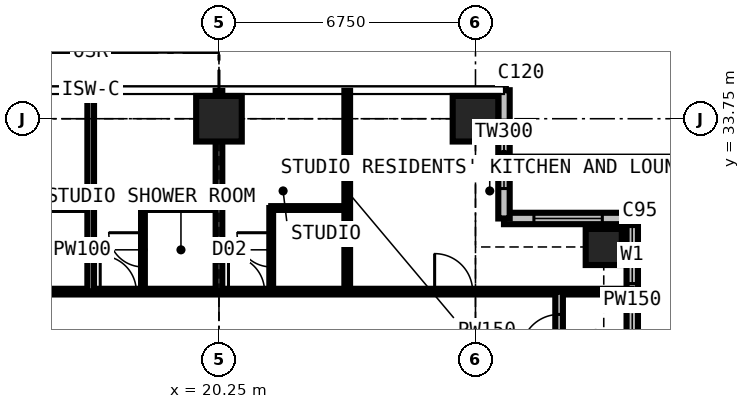
"""IFC4 building model, lengths in metres.
Left out: names, types, materials, properties, quantities, classifications, styles, units other than length and angle.
Written with IfcOpenShell. Run it as: python <this file> out.ifc"""

import sys

from ifc_helpers import new_model, si_unit, direction, frame, frame_2d, origin, origin_2d, place, context, subcontext, project, spatial, rectangle, extrude, element, fill, save


model = new_model("IFC4")
c1 = context("Model", 3, precision=1e-05, world=origin(), true_north=direction((0.0, 1.0)))
c2 = subcontext(c1, "Body", "Model", "MODEL_VIEW")
j1 = project(units=[si_unit("LENGTHUNIT", "METRE"), si_unit("PLANEANGLEUNIT", "RADIAN")], contexts=[c1])
p1 = place(None, origin())
s1 = spatial("IfcSite", under=j1, at=p1, CompositionType="ELEMENT")
p2 = place(p1, origin())
s2 = spatial("IfcBuilding", under=s1, at=p2, CompositionType="ELEMENT")
p3 = place(p2, frame((0.0, 0.0, 181.8)))
s3 = spatial("IfcBuildingStorey", under=s2, at=p3, CompositionType="ELEMENT", Elevation=181.8)
for number, where, z_axis, x_axis in (
    (1, (20.25, 33.75, 0.0), (0.0, 0.0, 1.0), (1.0, 0.0, 0.0)),
    (2, (27.0, 33.75, 0.0), (0.0, 0.0, 1.0), (1.0, 0.0, 0.0)),
):
    element("IfcColumn", number, at=place(p3, frame(where, z_axis=z_axis, x_axis=x_axis)), inside=s3, PredefinedType="COLUMN", context=c2, shape_type="SweptSolid", body=[
        extrude(rectangle(XDim=1.2, YDim=1.2, at=origin_2d()), origin(), (0.0, 0.0, 1.0), 3.6),
    ])
p4 = place(p3, frame((30.375, 30.375, 0.0), z_axis=(0.0, 0.0, 1.0), x_axis=(1.0, 0.0, 0.0)))
e3 = element("IfcColumn", 3, at=p4, inside=s3, PredefinedType="COLUMN", context=c2, shape_type="SweptSolid", body=[
    extrude(rectangle(XDim=0.95, YDim=0.95, at=origin_2d()), origin(), (0.0, 0.0, 1.0), 3.6),
])
p5 = place(p3, frame((31.125, 27.75, 0.0), z_axis=(0.0, 0.0, 1.0), x_axis=(0.0, 1.0, 0.0)))
e4 = element("IfcWall", 4, at=p5, inside=s3, PredefinedType="SOLIDWALL", context=c2, shape_type="SweptSolid", body=[
    extrude(rectangle(XDim=3.375, YDim=0.3, at=frame_2d((1.688, 0.0))), origin(), (0.0, 0.0, 1.0), 3.375),
])
p6 = place(p5, frame((1.663, 0.0, 0.9)))
e5 = element("IfcOpeningElement", 5, at=p6, cuts=e4, PredefinedType="OPENING", context=c2, shape_type="SweptSolid", body=[
    extrude(rectangle(XDim=1.5, YDim=1.8, at=frame_2d((0.75, 0.9))), frame((0.0, 0.16, 0.0), z_axis=(0.0, -1.0, 0.0), x_axis=(1.0, 0.0, 0.0)), (0.0, 0.0, 1.0), 0.32),
])
p7 = place(p3, frame((31.125, 31.125, 0.0), z_axis=(0.0, 0.0, 1.0), x_axis=(-1.0, 0.0, 0.0)))
e6 = element("IfcWall", 6, at=p7, inside=s3, PredefinedType="SOLIDWALL", context=c2, shape_type="SweptSolid", body=[
    extrude(rectangle(XDim=3.375, YDim=0.3, at=frame_2d((1.688, 0.0))), origin(), (0.0, 0.0, 1.0), 3.375),
])
p8 = place(p7, frame((0.788, 0.0, 0.6)))
e7 = element("IfcOpeningElement", 7, at=p8, cuts=e6, PredefinedType="OPENING", context=c2, shape_type="SweptSolid", body=[
    extrude(rectangle(XDim=1.8, YDim=2.1, at=frame_2d((0.9, 1.05))), frame((0.0, 0.16, 0.0), z_axis=(0.0, -1.0, 0.0), x_axis=(1.0, 0.0, 0.0)), (0.0, 0.0, 1.0), 0.32),
])
p9 = place(p3, frame((27.75, 31.125, 0.0), z_axis=(0.0, 0.0, 1.0), x_axis=(0.0, 1.0, 0.0)))
e8 = element("IfcWall", 8, at=p9, inside=s3, PredefinedType="SOLIDWALL", context=c2, shape_type="SweptSolid", body=[
    extrude(rectangle(XDim=3.375, YDim=0.3, at=frame_2d((1.688, 0.0))), origin(), (0.0, 0.0, 1.0), 3.375),
])
p10 = place(p9, frame((0.788, 0.0, 0.6)))
e9 = element("IfcOpeningElement", 9, at=p10, cuts=e8, PredefinedType="OPENING", context=c2, shape_type="SweptSolid", body=[
    extrude(rectangle(XDim=1.8, YDim=2.1, at=frame_2d((0.9, 1.05))), frame((0.0, 0.16, 0.0), z_axis=(0.0, -1.0, 0.0), x_axis=(1.0, 0.0, 0.0)), (0.0, 0.0, 1.0), 0.32),
])
p11 = place(p3, frame((11.3, 29.2, 0.0), z_axis=(0.0, 0.0, 1.0), x_axis=(1.0, 0.0, 0.0)))
e10 = element("IfcWall", 10, at=p11, inside=s3, PredefinedType="PARTITIONING", context=c2, shape_type="SweptSolid", body=[
    extrude(rectangle(XDim=19.809, YDim=0.15, at=frame_2d((9.904, 0.0))), origin(), (0.0, 0.0, 1.0), 3.375),
])
p12 = place(p11, frame((14.625, 0.0, 0.0)))
e11 = element("IfcOpeningElement", 11, at=p12, cuts=e10, PredefinedType="OPENING", context=c2, shape_type="SweptSolid", body=[
    extrude(rectangle(XDim=1.0, YDim=2.2, at=frame_2d((0.5, 1.1))), frame((0.0, 0.085, 0.0), z_axis=(0.0, -1.0, 0.0), x_axis=(1.0, 0.0, 0.0)), (0.0, 0.0, 1.0), 0.17),
])
p13 = place(p11, frame((5.825, 0.0, 0.0)))
e12 = element("IfcOpeningElement", 12, at=p13, cuts=e10, PredefinedType="OPENING", context=c2, shape_type="SweptSolid", body=[
    extrude(rectangle(XDim=0.95, YDim=2.2, at=frame_2d((0.475, 1.1))), frame((0.0, 0.085, 0.0), z_axis=(0.0, -1.0, 0.0), x_axis=(1.0, 0.0, 0.0)), (0.0, 0.0, 1.0), 0.17),
])
p14 = place(p11, frame((9.2, 0.0, 0.0)))
e13 = element("IfcOpeningElement", 13, at=p14, cuts=e10, PredefinedType="OPENING", context=c2, shape_type="SweptSolid", body=[
    extrude(rectangle(XDim=0.95, YDim=2.2, at=frame_2d((0.475, 1.1))), frame((0.0, 0.085, 0.0), z_axis=(0.0, -1.0, 0.0), x_axis=(1.0, 0.0, 0.0)), (0.0, 0.0, 1.0), 0.17),
])
p15 = place(p11, frame((0.6, 0.0, 0.0)))
e14 = element("IfcOpeningElement", 14, at=p15, cuts=e10, PredefinedType="OPENING", context=c2, shape_type="SweptSolid", body=[
    extrude(rectangle(XDim=1.0, YDim=2.2, at=frame_2d((0.5, 1.1))), frame((0.0, 0.085, 0.0), z_axis=(0.0, -1.0, 0.0), x_axis=(1.0, 0.0, 0.0)), (0.0, 0.0, 1.0), 0.17),
])
p16 = place(p3, frame((14.875, 31.4, 0.0), z_axis=(0.0, 0.0, 1.0), x_axis=(1.0, 0.0, 0.0)))
e15 = element("IfcWall", 15, at=p16, inside=s3, PredefinedType="PARTITIONING", context=c2, shape_type="SweptSolid", body=[
    extrude(rectangle(XDim=2.0, YDim=0.1, at=frame_2d((1.0, 0.0))), origin(), (0.0, 0.0, 1.0), 3.375),
])
p17 = place(p3, frame((16.875, 29.2, 0.0), z_axis=(0.0, 0.0, 1.0), x_axis=(0.0, 1.0, 0.0)))
e16 = element("IfcWall", 16, at=p17, inside=s3, PredefinedType="PARTITIONING", context=c2, shape_type="SweptSolid", body=[
    extrude(rectangle(XDim=5.284, YDim=0.175, at=frame_2d((2.642, 0.0))), origin(), (0.0, 0.0, 1.0), 3.375),
])
p18 = place(p3, frame((18.25, 29.2, 0.0), z_axis=(0.0, 0.0, 1.0), x_axis=(0.0, 1.0, 0.0)))
e17 = element("IfcWall", 17, at=p18, inside=s3, PredefinedType="PARTITIONING", context=c2, shape_type="SweptSolid", body=[
    extrude(rectangle(XDim=2.2, YDim=0.1, at=frame_2d((1.1, 0.0))), origin(), (0.0, 0.0, 1.0), 3.375),
])
p19 = place(p18, frame((0.65, 0.0, 0.0)))
e18 = element("IfcOpeningElement", 18, at=p19, cuts=e17, PredefinedType="OPENING", context=c2, shape_type="SweptSolid", body=[
    extrude(rectangle(XDim=0.9, YDim=2.2, at=frame_2d((0.45, 1.1))), frame((0.0, 0.06, 0.0), z_axis=(0.0, -1.0, 0.0), x_axis=(1.0, 0.0, 0.0)), (0.0, 0.0, 1.0), 0.12),
])
p20 = place(p3, frame((18.25, 31.4, 0.0), z_axis=(0.0, 0.0, 1.0), x_axis=(1.0, 0.0, 0.0)))
e19 = element("IfcWall", 19, at=p20, inside=s3, PredefinedType="PARTITIONING", context=c2, shape_type="SweptSolid", body=[
    extrude(rectangle(XDim=2.0, YDim=0.1, at=frame_2d((1.0, 0.0))), origin(), (0.0, 0.0, 1.0), 3.375),
])
p21 = place(p3, frame((20.25, 29.2, 0.0), z_axis=(0.0, 0.0, 1.0), x_axis=(0.0, 1.0, 0.0)))
e20 = element("IfcWall", 20, at=p21, inside=s3, PredefinedType="PARTITIONING", context=c2, shape_type="SweptSolid", body=[
    extrude(rectangle(XDim=5.284, YDim=0.175, at=frame_2d((2.642, 0.0))), origin(), (0.0, 0.0, 1.0), 2.61),
])
p22 = place(p3, frame((21.625, 29.2, 0.0), z_axis=(0.0, 0.0, 1.0), x_axis=(0.0, 1.0, 0.0)))
e21 = element("IfcWall", 21, at=p22, inside=s3, PredefinedType="PARTITIONING", context=c2, shape_type="SweptSolid", body=[
    extrude(rectangle(XDim=2.2, YDim=0.1, at=frame_2d((1.1, 0.0))), origin(), (0.0, 0.0, 1.0), 3.375),
])
p23 = place(p22, frame((0.65, 0.0, 0.0)))
e22 = element("IfcOpeningElement", 22, at=p23, cuts=e21, PredefinedType="OPENING", context=c2, shape_type="SweptSolid", body=[
    extrude(rectangle(XDim=0.9, YDim=2.2, at=frame_2d((0.45, 1.1))), frame((0.0, 0.06, 0.0), z_axis=(0.0, -1.0, 0.0), x_axis=(1.0, 0.0, 0.0)), (0.0, 0.0, 1.0), 0.12),
])
p24 = place(p3, frame((21.625, 31.4, 0.0), z_axis=(0.0, 0.0, 1.0), x_axis=(1.0, 0.0, 0.0)))
e23 = element("IfcWall", 23, at=p24, inside=s3, PredefinedType="PARTITIONING", context=c2, shape_type="SweptSolid", body=[
    extrude(rectangle(XDim=2.0, YDim=0.1, at=frame_2d((1.0, 0.0))), origin(), (0.0, 0.0, 1.0), 3.375),
])
p25 = place(p3, frame((23.625, 29.2, 0.0), z_axis=(0.0, 0.0, 1.0), x_axis=(0.0, 1.0, 0.0)))
e24 = element("IfcWall", 24, at=p25, inside=s3, PredefinedType="PARTITIONING", context=c2, shape_type="SweptSolid", body=[
    extrude(rectangle(XDim=5.284, YDim=0.15, at=frame_2d((2.642, 0.0))), origin(), (0.0, 0.0, 1.0), 3.375),
])
p26 = place(p3, frame((29.2, 13.5, 0.0), z_axis=(0.0, 0.0, 1.0), x_axis=(0.0, 1.0, 0.0)))
e25 = element("IfcWall", 25, at=p26, inside=s3, PredefinedType="PARTITIONING", context=c2, shape_type="SweptSolid", body=[
    extrude(rectangle(XDim=15.7, YDim=0.2, at=frame_2d((7.85, 0.0))), origin(), (0.0, 0.0, 1.0), 3.375),
])
p27 = place(p26, frame((3.625, 0.0, 0.0)))
e26 = element("IfcOpeningElement", 26, at=p27, cuts=e25, PredefinedType="OPENING", context=c2, shape_type="SweptSolid", body=[
    extrude(rectangle(XDim=0.95, YDim=2.2, at=frame_2d((0.475, 1.1))), frame((0.0, 0.11, 0.0), z_axis=(0.0, -1.0, 0.0), x_axis=(1.0, 0.0, 0.0)), (0.0, 0.0, 1.0), 0.22),
])
p28 = place(p26, frame((7.0, 0.0, 0.0)))
e27 = element("IfcOpeningElement", 27, at=p28, cuts=e25, PredefinedType="OPENING", context=c2, shape_type="SweptSolid", body=[
    extrude(rectangle(XDim=0.95, YDim=2.2, at=frame_2d((0.475, 1.1))), frame((0.0, 0.11, 0.0), z_axis=(0.0, -1.0, 0.0), x_axis=(1.0, 0.0, 0.0)), (0.0, 0.0, 1.0), 0.22),
])
p29 = place(p26, frame((10.375, 0.0, 0.0)))
e28 = element("IfcOpeningElement", 28, at=p29, cuts=e25, PredefinedType="OPENING", context=c2, shape_type="SweptSolid", body=[
    extrude(rectangle(XDim=0.95, YDim=2.2, at=frame_2d((0.475, 1.1))), frame((0.0, 0.11, 0.0), z_axis=(0.0, -1.0, 0.0), x_axis=(1.0, 0.0, 0.0)), (0.0, 0.0, 1.0), 0.22),
])
p30 = place(p26, frame((14.1, 0.0, 0.0)))
e29 = element("IfcOpeningElement", 29, at=p30, cuts=e25, PredefinedType="OPENING", context=c2, shape_type="SweptSolid", body=[
    extrude(rectangle(XDim=1.0, YDim=2.2, at=frame_2d((0.5, 1.1))), frame((0.0, 0.11, 0.0), z_axis=(0.0, -1.0, 0.0), x_axis=(1.0, 0.0, 0.0)), (0.0, 0.0, 1.0), 0.22),
])
p31 = place(p6, origin())
e30 = element("IfcWindow", 30, at=p31, inside=s3, PartitioningType="SINGLE_PANEL", PredefinedType="WINDOW", context=c2, shape_type="SweptSolid", body=[
    extrude(rectangle(XDim=1.5, YDim=1.8, at=frame_2d((0.75, 0.9))), frame((0.0, 0.03, 0.0), z_axis=(0.0, -1.0, 0.0), x_axis=(1.0, 0.0, 0.0)), (0.0, 0.0, 1.0), 0.06),
])
fill(e5, e30)
p32 = place(p8, origin())
e31 = element("IfcWindow", 31, at=p32, inside=s3, PartitioningType="SINGLE_PANEL", PredefinedType="WINDOW", context=c2, shape_type="SweptSolid", body=[
    extrude(rectangle(XDim=1.8, YDim=2.1, at=frame_2d((0.9, 1.05))), frame((0.0, 0.03, 0.0), z_axis=(0.0, -1.0, 0.0), x_axis=(1.0, 0.0, 0.0)), (0.0, 0.0, 1.0), 0.06),
])
fill(e7, e31)
p33 = place(p10, origin())
e32 = element("IfcWindow", 32, at=p33, inside=s3, PartitioningType="SINGLE_PANEL", PredefinedType="WINDOW", context=c2, shape_type="SweptSolid", body=[
    extrude(rectangle(XDim=1.8, YDim=2.1, at=frame_2d((0.9, 1.05))), frame((0.0, 0.03, 0.0), z_axis=(0.0, -1.0, 0.0), x_axis=(1.0, 0.0, 0.0)), (0.0, 0.0, 1.0), 0.06),
])
fill(e9, e32)
p34 = place(p30, origin())
e33 = element("IfcDoor", 33, at=p34, inside=s3, OperationType="SINGLE_SWING_LEFT", PredefinedType="DOOR", context=c2, shape_type="SweptSolid", body=[
    extrude(rectangle(XDim=1.0, YDim=2.2, at=frame_2d((0.5, 1.1))), frame((0.0, 0.025, 0.0), z_axis=(0.0, -1.0, 0.0), x_axis=(1.0, 0.0, 0.0)), (0.0, 0.0, 1.0), 0.05),
])
fill(e29, e33)
p35 = place(p12, origin())
e34 = element("IfcDoor", 34, at=p35, inside=s3, OperationType="SINGLE_SWING_LEFT", PredefinedType="DOOR", context=c2, shape_type="SweptSolid", body=[
    extrude(rectangle(XDim=1.0, YDim=2.2, at=frame_2d((0.5, 1.1))), frame((0.0, 0.025, 0.0), z_axis=(0.0, -1.0, 0.0), x_axis=(1.0, 0.0, 0.0)), (0.0, 0.0, 1.0), 0.05),
])
fill(e11, e34)
p36 = place(p13, origin())
e35 = element("IfcDoor", 35, at=p36, inside=s3, OperationType="SINGLE_SWING_LEFT", PredefinedType="DOOR", context=c2, shape_type="SweptSolid", body=[
    extrude(rectangle(XDim=0.95, YDim=2.2, at=frame_2d((0.475, 1.1))), frame((0.0, 0.025, 0.0), z_axis=(0.0, -1.0, 0.0), x_axis=(1.0, 0.0, 0.0)), (0.0, 0.0, 1.0), 0.05),
])
fill(e12, e35)
p37 = place(p19, origin())
e36 = element("IfcDoor", 36, at=p37, inside=s3, OperationType="SINGLE_SWING_RIGHT", PredefinedType="DOOR", context=c2, shape_type="SweptSolid", body=[
    extrude(rectangle(XDim=0.9, YDim=2.2, at=frame_2d((0.45, 1.1))), frame((0.0, 0.025, 0.0), z_axis=(0.0, -1.0, 0.0), x_axis=(1.0, 0.0, 0.0)), (0.0, 0.0, 1.0), 0.05),
])
fill(e18, e36)
p38 = place(p14, origin())
e37 = element("IfcDoor", 37, at=p38, inside=s3, OperationType="SINGLE_SWING_LEFT", PredefinedType="DOOR", context=c2, shape_type="SweptSolid", body=[
    extrude(rectangle(XDim=0.95, YDim=2.2, at=frame_2d((0.475, 1.1))), frame((0.0, 0.025, 0.0), z_axis=(0.0, -1.0, 0.0), x_axis=(1.0, 0.0, 0.0)), (0.0, 0.0, 1.0), 0.05),
])
fill(e13, e37)
p39 = place(p23, origin())
e38 = element("IfcDoor", 38, at=p39, inside=s3, OperationType="SINGLE_SWING_RIGHT", PredefinedType="DOOR", context=c2, shape_type="SweptSolid", body=[
    extrude(rectangle(XDim=0.9, YDim=2.2, at=frame_2d((0.45, 1.1))), frame((0.0, 0.025, 0.0), z_axis=(0.0, -1.0, 0.0), x_axis=(1.0, 0.0, 0.0)), (0.0, 0.0, 1.0), 0.05),
])
fill(e22, e38)
save(model, sys.argv[1])
